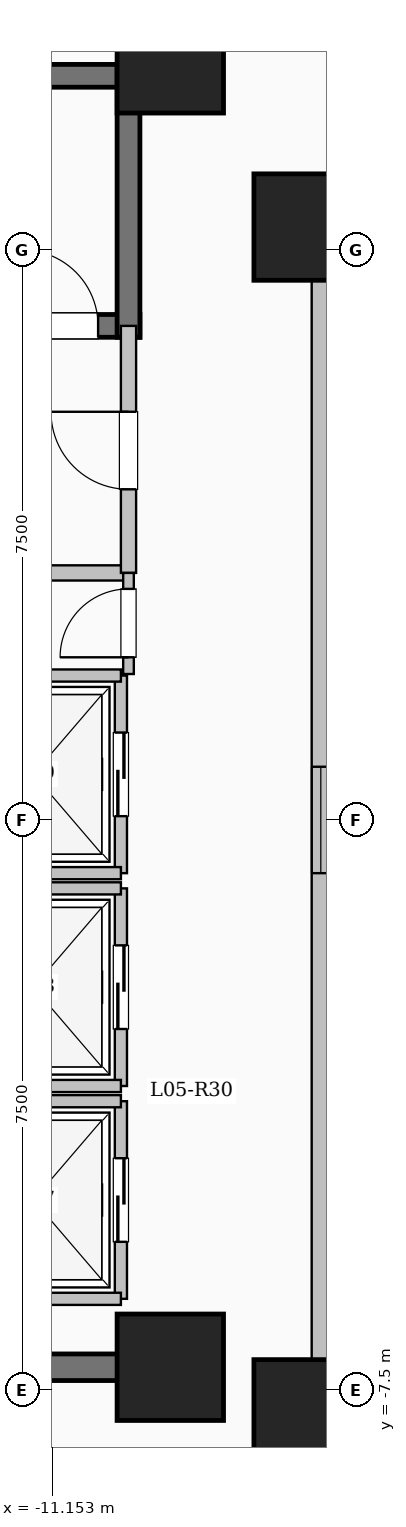
"""IFC4 building model, lengths in metres.
Left out: names, types, materials, properties, quantities, classifications, styles, units other than length and angle.
Written with IfcOpenShell. Run it as: python <this file> out.ifc"""

import sys

from ifc_helpers import new_model, si_unit, direction, frame, frame_2d, origin, origin_2d, place, context, subcontext, project, spatial, rectangle, extrude, element, fill, save


model = new_model("IFC4")
c1 = context("Model", 3, precision=1e-05, world=origin(), true_north=direction((0.0, 1.0)))
c2 = subcontext(c1, "Body", "Model", "MODEL_VIEW")
j1 = project(units=[si_unit("LENGTHUNIT", "METRE"), si_unit("PLANEANGLEUNIT", "RADIAN")], contexts=[c1])
p1 = place(None, origin())
s1 = spatial("IfcSite", under=j1, at=p1, CompositionType="ELEMENT")
p2 = place(p1, origin())
s2 = spatial("IfcBuilding", under=s1, at=p2, CompositionType="ELEMENT")
p3 = place(p2, frame((0.0, 0.0, 24.0)))
s3 = spatial("IfcBuildingStorey", under=s2, at=p3, CompositionType="ELEMENT", Elevation=24.0)
for number, where, z_axis, x_axis in (
    (1, (-7.8, -7.8, 0.0), (0.0, 0.0, 1.0), (1.0, 0.0, 0.0)),
    (2, (-7.8, 7.8, 0.0), (0.0, 0.0, 1.0), (1.0, 0.0, 0.0)),
    (3, (-9.6, -7.2, 0.0), (0.0, 0.0, 1.0), (1.0, 0.0, 0.0)),
    (4, (-9.6, 10.0, 0.0), (0.0, 0.0, 1.0), (1.0, 0.0, 0.0)),
):
    element("IfcColumn", number, at=place(p3, frame(where, z_axis=z_axis, x_axis=x_axis)), inside=s3, PredefinedType="COLUMN", context=c2, shape_type="SweptSolid", body=[
        extrude(rectangle(XDim=1.4, YDim=1.4, at=origin_2d()), origin(), (0.0, 0.0, 1.0), 3.35),
    ])
p4 = place(p3, frame((-7.62, -7.62, 0.0), z_axis=(0.0, 0.0, 1.0), x_axis=(1.0, 0.0, 0.0)))
e5 = element("IfcWall", 5, at=p4, inside=s3, PredefinedType="SOLIDWALL", context=c2, shape_type="SweptSolid", body=[
    extrude(rectangle(XDim=15.24, YDim=0.24, at=frame_2d((7.62, 0.0))), origin(), (0.0, 0.0, 1.0), 3.1),
])
p5 = place(p4, frame((6.92, 0.0, 0.95)))
e6 = element("IfcOpeningElement", 6, at=p5, cuts=e5, PredefinedType="OPENING", context=c2, shape_type="SweptSolid", body=[
    extrude(rectangle(XDim=1.4, YDim=1.5, at=frame_2d((0.7, 0.75))), frame((0.0, 0.13, 0.0), z_axis=(0.0, -1.0, 0.0), x_axis=(1.0, 0.0, 0.0)), (0.0, 0.0, 1.0), 0.26),
])
p6 = place(p3, frame((7.62, 7.62, 0.0), z_axis=(0.0, 0.0, 1.0), x_axis=(-1.0, 0.0, 0.0)))
e7 = element("IfcWall", 7, at=p6, inside=s3, PredefinedType="SOLIDWALL", context=c2, shape_type="SweptSolid", body=[
    extrude(rectangle(XDim=15.24, YDim=0.24, at=frame_2d((7.62, 0.0))), origin(), (0.0, 0.0, 1.0), 3.1),
])
p7 = place(p6, frame((6.92, 0.0, 0.95)))
e8 = element("IfcOpeningElement", 8, at=p7, cuts=e7, PredefinedType="OPENING", context=c2, shape_type="SweptSolid", body=[
    extrude(rectangle(XDim=1.4, YDim=1.5, at=frame_2d((0.7, 0.75))), frame((0.0, 0.13, 0.0), z_axis=(0.0, -1.0, 0.0), x_axis=(1.0, 0.0, 0.0)), (0.0, 0.0, 1.0), 0.26),
])
p8 = place(p3, frame((-7.62, 7.62, 0.0), z_axis=(0.0, 0.0, 1.0), x_axis=(0.0, -1.0, 0.0)))
e9 = element("IfcWall", 9, at=p8, inside=s3, PredefinedType="SOLIDWALL", context=c2, shape_type="SweptSolid", body=[
    extrude(rectangle(XDim=15.24, YDim=0.24, at=frame_2d((7.62, 0.0))), origin(), (0.0, 0.0, 1.0), 3.1),
])
p9 = place(p8, frame((6.92, 0.0, 0.95)))
e10 = element("IfcOpeningElement", 10, at=p9, cuts=e9, PredefinedType="OPENING", context=c2, shape_type="SweptSolid", body=[
    extrude(rectangle(XDim=1.4, YDim=1.5, at=frame_2d((0.7, 0.75))), frame((0.0, 0.13, 0.0), z_axis=(0.0, -1.0, 0.0), x_axis=(1.0, 0.0, 0.0)), (0.0, 0.0, 1.0), 0.26),
])
p10 = place(p3, frame((-18.0, 9.79, 0.0), z_axis=(0.0, 0.0, 1.0), x_axis=(1.0, 0.0, 0.0)))
e11 = element("IfcWall", 11, at=p10, inside=s3, PredefinedType="SHEAR", context=c2, shape_type="SweptSolid", body=[
    extrude(rectangle(XDim=8.0, YDim=0.3, at=frame_2d((4.0, 0.0))), origin(), (0.0, 0.0, 1.0), 3.35),
])
p11 = place(p3, frame((-18.0, 6.5, 0.0), z_axis=(0.0, 0.0, 1.0), x_axis=(1.0, 0.0, 0.0)))
e12 = element("IfcWall", 12, at=p11, inside=s3, PredefinedType="SHEAR", context=c2, shape_type="SweptSolid", body=[
    extrude(rectangle(XDim=8.0, YDim=0.3, at=frame_2d((4.0, 0.0))), origin(), (0.0, 0.0, 1.0), 3.35),
])
p12 = place(p11, frame((6.45, 0.0, 0.0)))
e13 = element("IfcOpeningElement", 13, at=p12, cuts=e12, PredefinedType="OPENING", context=c2, shape_type="SweptSolid", body=[
    extrude(rectangle(XDim=1.0, YDim=2.15, at=frame_2d((0.5, 1.075))), frame((0.0, 0.16, 0.0), z_axis=(0.0, -1.0, 0.0), x_axis=(1.0, 0.0, 0.0)), (0.0, 0.0, 1.0), 0.32),
])
p13 = place(p3, frame((-10.15, 6.35, 0.0), z_axis=(0.0, 0.0, 1.0), x_axis=(0.0, 1.0, 0.0)))
e14 = element("IfcWall", 14, at=p13, inside=s3, PredefinedType="SHEAR", context=c2, shape_type="SweptSolid", body=[
    extrude(rectangle(XDim=3.59, YDim=0.3, at=frame_2d((1.795, 0.0))), origin(), (0.0, 0.0, 1.0), 3.35),
])
p14 = place(p3, frame((-15.55, 3.25, 0.0), z_axis=(0.0, 0.0, 1.0), x_axis=(1.0, 0.0, 0.0)))
e15 = element("IfcWall", 15, at=p14, inside=s3, PredefinedType="SOLIDWALL", context=c2, shape_type="SweptSolid", body=[
    extrude(rectangle(XDim=5.4, YDim=0.2, at=frame_2d((2.7, 0.0))), origin(), (0.0, 0.0, 1.0), 3.1),
])
p15 = place(p3, frame((-10.15, 3.25, 0.0), z_axis=(0.0, 0.0, 1.0), x_axis=(0.0, 1.0, 0.0)))
e16 = element("IfcWall", 16, at=p15, inside=s3, PredefinedType="SOLIDWALL", context=c2, shape_type="SweptSolid", body=[
    extrude(rectangle(XDim=3.25, YDim=0.2, at=frame_2d((1.625, 0.0))), origin(), (0.0, 0.0, 1.0), 3.1),
])
p16 = place(p15, frame((1.1, 0.0, 0.0)))
e17 = element("IfcOpeningElement", 17, at=p16, cuts=e16, PredefinedType="OPENING", context=c2, shape_type="SweptSolid", body=[
    extrude(rectangle(XDim=1.02, YDim=2.15, at=frame_2d((0.51, 1.075))), frame((0.0, 0.11, 0.0), z_axis=(0.0, -1.0, 0.0), x_axis=(1.0, 0.0, 0.0)), (0.0, 0.0, 1.0), 0.22),
])
p17 = place(p3, frame((-10.25, -6.3, 0.0), z_axis=(0.0, 0.0, 1.0), x_axis=(0.0, 1.0, 0.0)))
e18 = element("IfcWall", 18, at=p17, inside=s3, PredefinedType="SOLIDWALL", context=c2, shape_type="SweptSolid", body=[
    extrude(rectangle(XDim=2.6, YDim=0.16, at=frame_2d((1.3, 0.0))), origin(), (0.0, 0.0, 1.0), 3.1),
])
p18 = place(p17, frame((0.75, 0.0, 0.0)))
e19 = element("IfcOpeningElement", 19, at=p18, cuts=e18, PredefinedType="OPENING", context=c2, shape_type="SweptSolid", body=[
    extrude(rectangle(XDim=1.1, YDim=2.15, at=frame_2d((0.55, 1.075))), frame((0.0, 0.09, 0.0), z_axis=(0.0, -1.0, 0.0), x_axis=(1.0, 0.0, 0.0)), (0.0, 0.0, 1.0), 0.18),
])
for number, where, z_axis, x_axis in (
    (20, (-12.55, -6.3, 0.0), (0.0, 0.0, 1.0), (1.0, 0.0, 0.0)),
    (21, (-12.55, -3.7, 0.0), (0.0, 0.0, 1.0), (1.0, 0.0, 0.0)),
):
    element("IfcWall", number, at=place(p3, frame(where, z_axis=z_axis, x_axis=x_axis)), inside=s3, PredefinedType="SOLIDWALL", context=c2, shape_type="SweptSolid", body=[
        extrude(rectangle(XDim=2.3, YDim=0.16, at=frame_2d((1.15, 0.0))), origin(), (0.0, 0.0, 1.0), 3.1),
    ])
p19 = place(p3, frame((-10.25, -3.5, 0.0), z_axis=(0.0, 0.0, 1.0), x_axis=(0.0, 1.0, 0.0)))
e22 = element("IfcWall", 22, at=p19, inside=s3, PredefinedType="SOLIDWALL", context=c2, shape_type="SweptSolid", body=[
    extrude(rectangle(XDim=2.6, YDim=0.16, at=frame_2d((1.3, 0.0))), origin(), (0.0, 0.0, 1.0), 3.1),
])
p20 = place(p19, frame((0.75, 0.0, 0.0)))
e23 = element("IfcOpeningElement", 23, at=p20, cuts=e22, PredefinedType="OPENING", context=c2, shape_type="SweptSolid", body=[
    extrude(rectangle(XDim=1.1, YDim=2.15, at=frame_2d((0.55, 1.075))), frame((0.0, 0.09, 0.0), z_axis=(0.0, -1.0, 0.0), x_axis=(1.0, 0.0, 0.0)), (0.0, 0.0, 1.0), 0.18),
])
for number, where, z_axis, x_axis in (
    (24, (-12.55, -3.5, 0.0), (0.0, 0.0, 1.0), (1.0, 0.0, 0.0)),
    (25, (-12.55, -0.9, 0.0), (0.0, 0.0, 1.0), (1.0, 0.0, 0.0)),
):
    element("IfcWall", number, at=place(p3, frame(where, z_axis=z_axis, x_axis=x_axis)), inside=s3, PredefinedType="SOLIDWALL", context=c2, shape_type="SweptSolid", body=[
        extrude(rectangle(XDim=2.3, YDim=0.16, at=frame_2d((1.15, 0.0))), origin(), (0.0, 0.0, 1.0), 3.1),
    ])
p21 = place(p3, frame((-10.25, -0.7, 0.0), z_axis=(0.0, 0.0, 1.0), x_axis=(0.0, 1.0, 0.0)))
e26 = element("IfcWall", 26, at=p21, inside=s3, PredefinedType="SOLIDWALL", context=c2, shape_type="SweptSolid", body=[
    extrude(rectangle(XDim=2.6, YDim=0.16, at=frame_2d((1.3, 0.0))), origin(), (0.0, 0.0, 1.0), 3.1),
])
p22 = place(p21, frame((0.75, 0.0, 0.0)))
e27 = element("IfcOpeningElement", 27, at=p22, cuts=e26, PredefinedType="OPENING", context=c2, shape_type="SweptSolid", body=[
    extrude(rectangle(XDim=1.1, YDim=2.15, at=frame_2d((0.55, 1.075))), frame((0.0, 0.09, 0.0), z_axis=(0.0, -1.0, 0.0), x_axis=(1.0, 0.0, 0.0)), (0.0, 0.0, 1.0), 0.18),
])
for number, where, z_axis, x_axis in (
    (28, (-12.55, -0.7, 0.0), (0.0, 0.0, 1.0), (1.0, 0.0, 0.0)),
    (29, (-12.55, 1.9, 0.0), (0.0, 0.0, 1.0), (1.0, 0.0, 0.0)),
):
    element("IfcWall", number, at=place(p3, frame(where, z_axis=z_axis, x_axis=x_axis)), inside=s3, PredefinedType="SOLIDWALL", context=c2, shape_type="SweptSolid", body=[
        extrude(rectangle(XDim=2.3, YDim=0.16, at=frame_2d((1.15, 0.0))), origin(), (0.0, 0.0, 1.0), 3.1),
    ])
p23 = place(p3, frame((-18.625, -7.2, 0.0), z_axis=(0.0, 0.0, 1.0), x_axis=(1.0, 0.0, 0.0)))
e30 = element("IfcWall", 30, at=p23, inside=s3, PredefinedType="SHEAR", context=c2, shape_type="SweptSolid", body=[
    extrude(rectangle(XDim=8.55, YDim=0.35, at=frame_2d((4.275, 0.0))), origin(), (0.0, 0.0, 1.0), 3.35),
])
p24 = place(p3, frame((-10.15, 1.92, 0.0), z_axis=(0.0, 0.0, 1.0), x_axis=(0.0, 1.0, 0.0)))
e31 = element("IfcWall", 31, at=p24, inside=s3, PredefinedType="PARTITIONING", context=c2, shape_type="SweptSolid", body=[
    extrude(rectangle(XDim=1.33, YDim=0.14, at=frame_2d((0.665, 0.0))), origin(), (0.0, 0.0, 1.0), 3.1),
])
p25 = place(p24, frame((0.22, 0.0, 0.0)))
e32 = element("IfcOpeningElement", 32, at=p25, cuts=e31, PredefinedType="OPENING", context=c2, shape_type="SweptSolid", body=[
    extrude(rectangle(XDim=0.9, YDim=2.08, at=frame_2d((0.45, 1.04))), frame((0.0, 0.08, 0.0), z_axis=(0.0, -1.0, 0.0), x_axis=(1.0, 0.0, 0.0)), (0.0, 0.0, 1.0), 0.16),
])
p26 = place(p9, origin())
e33 = element("IfcWindow", 33, at=p26, inside=s3, PartitioningType="SINGLE_PANEL", PredefinedType="WINDOW", context=c2, shape_type="SweptSolid", body=[
    extrude(rectangle(XDim=1.4, YDim=1.5, at=frame_2d((0.7, 0.75))), frame((0.0, 0.03, 0.0), z_axis=(0.0, -1.0, 0.0), x_axis=(1.0, 0.0, 0.0)), (0.0, 0.0, 1.0), 0.06),
])
fill(e10, e33)
p27 = place(p12, origin())
e34 = element("IfcDoor", 34, at=p27, inside=s3, OperationType="SINGLE_SWING_LEFT", PredefinedType="DOOR", context=c2, shape_type="SweptSolid", body=[
    extrude(rectangle(XDim=1.0, YDim=2.15, at=frame_2d((0.5, 1.075))), frame((0.0, 0.025, 0.0), z_axis=(0.0, -1.0, 0.0), x_axis=(1.0, 0.0, 0.0)), (0.0, 0.0, 1.0), 0.05),
])
fill(e13, e34)
p28 = place(p16, origin())
e35 = element("IfcDoor", 35, at=p28, inside=s3, OperationType="SINGLE_SWING_RIGHT", PredefinedType="DOOR", context=c2, shape_type="SweptSolid", body=[
    extrude(rectangle(XDim=1.02, YDim=2.15, at=frame_2d((0.51, 1.075))), frame((0.0, 0.025, 0.0), z_axis=(0.0, -1.0, 0.0), x_axis=(1.0, 0.0, 0.0)), (0.0, 0.0, 1.0), 0.05),
])
fill(e17, e35)
p29 = place(p18, origin())
e36 = element("IfcDoor", 36, at=p29, inside=s3, OperationType="SLIDING_TO_LEFT", PredefinedType="DOOR", context=c2, shape_type="SweptSolid", body=[
    extrude(rectangle(XDim=1.1, YDim=2.15, at=frame_2d((0.55, 1.075))), frame((0.0, 0.025, 0.0), z_axis=(0.0, -1.0, 0.0), x_axis=(1.0, 0.0, 0.0)), (0.0, 0.0, 1.0), 0.05),
])
fill(e19, e36)
p30 = place(p20, origin())
e37 = element("IfcDoor", 37, at=p30, inside=s3, OperationType="SLIDING_TO_LEFT", PredefinedType="DOOR", context=c2, shape_type="SweptSolid", body=[
    extrude(rectangle(XDim=1.1, YDim=2.15, at=frame_2d((0.55, 1.075))), frame((0.0, 0.025, 0.0), z_axis=(0.0, -1.0, 0.0), x_axis=(1.0, 0.0, 0.0)), (0.0, 0.0, 1.0), 0.05),
])
fill(e23, e37)
p31 = place(p22, origin())
e38 = element("IfcDoor", 38, at=p31, inside=s3, OperationType="SLIDING_TO_LEFT", PredefinedType="DOOR", context=c2, shape_type="SweptSolid", body=[
    extrude(rectangle(XDim=1.1, YDim=2.15, at=frame_2d((0.55, 1.075))), frame((0.0, 0.025, 0.0), z_axis=(0.0, -1.0, 0.0), x_axis=(1.0, 0.0, 0.0)), (0.0, 0.0, 1.0), 0.05),
])
fill(e27, e38)
p32 = place(p25, origin())
e39 = element("IfcDoor", 39, at=p32, inside=s3, OperationType="SINGLE_SWING_LEFT", PredefinedType="DOOR", context=c2, shape_type="SweptSolid", body=[
    extrude(rectangle(XDim=0.9, YDim=2.08, at=frame_2d((0.45, 1.04))), frame((0.0, 0.025, 0.0), z_axis=(0.0, -1.0, 0.0), x_axis=(1.0, 0.0, 0.0)), (0.0, 0.0, 1.0), 0.05),
])
fill(e32, e39)
save(model, sys.argv[1])
